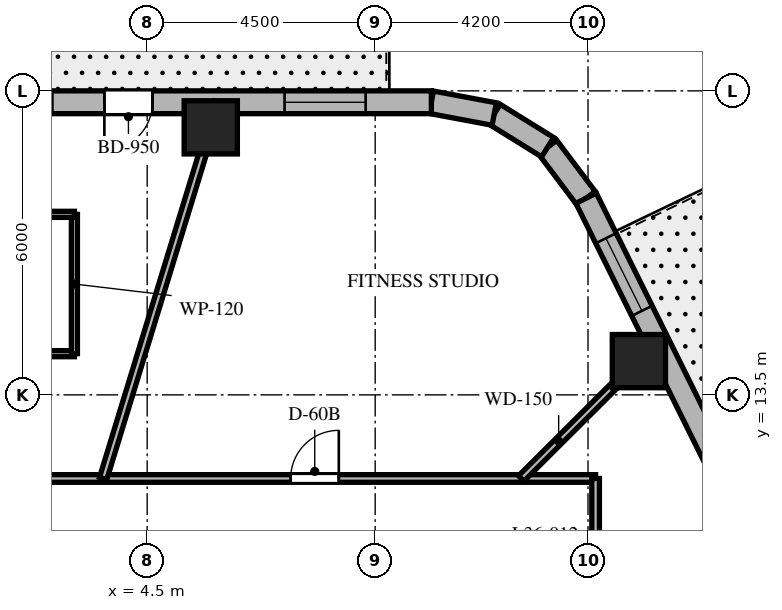
"""IFC4 building model, lengths in metres.
Left out: names, types, materials, properties, quantities, classifications, styles, units other than length and angle.
Written with IfcOpenShell. Run it as: python <this file> out.ifc"""

import sys

from ifc_helpers import new_model, si_unit, direction, frame, frame_2d, origin, origin_2d, place, context, subcontext, project, spatial, rectangle, extrude, element, fill, save


model = new_model("IFC4")
c1 = context("Model", 3, precision=1e-05, world=origin(), true_north=direction((0.0, 1.0)))
c2 = subcontext(c1, "Body", "Model", "MODEL_VIEW")
j1 = project(units=[si_unit("LENGTHUNIT", "METRE"), si_unit("PLANEANGLEUNIT", "RADIAN")], contexts=[c1])
p1 = place(None, origin())
s1 = spatial("IfcSite", under=j1, at=p1, CompositionType="ELEMENT")
p2 = place(p1, origin())
s2 = spatial("IfcBuilding", under=s1, at=p2, CompositionType="ELEMENT")
p3 = place(p2, frame((0.0, 0.0, 148.0)))
s3 = spatial("IfcBuildingStorey", under=s2, at=p3, CompositionType="ELEMENT", Elevation=148.0)
for number, where, z_axis, x_axis in (
    (1, (14.204, 14.166, 0.0), (0.0, 0.0, 1.0), (1.0, 0.0, 0.0)),
    (2, (5.755, 18.78, 0.0), (0.0, 0.0, 1.0), (1.0, 0.0, 0.0)),
):
    element("IfcColumn", number, at=place(p3, frame(where, z_axis=z_axis, x_axis=x_axis)), inside=s3, PredefinedType="COLUMN", context=c2, shape_type="SweptSolid", body=[
        extrude(rectangle(XDim=1.05, YDim=1.05, at=origin_2d()), origin(), (0.0, 0.0, 1.0), 3.7),
    ])
p4 = place(p3, frame((13.162, 17.381, 0.0), z_axis=(0.0, 0.0, 1.0), x_axis=(-0.601515770517, 0.798860925205, 0.0)))
e3 = element("IfcWall", 3, at=p4, inside=s3, PredefinedType="SOLIDWALL", context=c2, shape_type="SweptSolid", body=[
    extrude(rectangle(XDim=1.262, YDim=0.45, at=frame_2d((0.631, 0.0))), origin(), (0.0, 0.0, 1.0), 3.4),
])
p5 = place(p3, frame((12.403, 18.389, 0.0), z_axis=(0.0, 0.0, 1.0), x_axis=(-0.849795170926, 0.527113049991, 0.0)))
e4 = element("IfcWall", 4, at=p5, inside=s3, PredefinedType="SOLIDWALL", context=c2, shape_type="SweptSolid", body=[
    extrude(rectangle(XDim=1.241, YDim=0.45, at=frame_2d((0.62, 0.0))), origin(), (0.0, 0.0, 1.0), 3.4),
])
p6 = place(p3, frame((11.349, 19.043, 0.0), z_axis=(0.0, 0.0, 1.0), x_axis=(-0.982931267051, 0.183973161772, 0.0)))
e5 = element("IfcWall", 5, at=p6, inside=s3, PredefinedType="SOLIDWALL", context=c2, shape_type="SweptSolid", body=[
    extrude(rectangle(XDim=1.262, YDim=0.45, at=frame_2d((0.631, 0.0))), origin(), (0.0, 0.0, 1.0), 3.4),
])
p7 = place(p3, frame((20.618, 2.344, 0.0), z_axis=(0.0, 0.0, 1.0), x_axis=(-0.444243691097, 0.895905990002, 0.0)))
e6 = element("IfcWall", 6, at=p7, inside=s3, PredefinedType="SOLIDWALL", context=c2, shape_type="SweptSolid", body=[
    extrude(rectangle(XDim=16.784, YDim=0.45, at=frame_2d((8.392, 0.0))), origin(), (0.0, 0.0, 1.0), 3.4),
])
p8 = place(p7, frame((4.535, 0.0, 0.0)))
e7 = element("IfcOpeningElement", 7, at=p8, cuts=e6, PredefinedType="OPENING", context=c2, shape_type="SweptSolid", body=[
    extrude(rectangle(XDim=1.0, YDim=2.15, at=frame_2d((0.5, 1.075))), frame((0.0, 0.235, 0.0), z_axis=(0.0, -1.0, 0.0), x_axis=(1.0, 0.0, 0.0)), (0.0, 0.0, 1.0), 0.47),
])
p9 = place(p7, frame((7.642, 0.0, 0.8)))
e8 = element("IfcOpeningElement", 8, at=p9, cuts=e6, PredefinedType="OPENING", context=c2, shape_type="SweptSolid", body=[
    extrude(rectangle(XDim=1.6, YDim=1.75, at=frame_2d((0.8, 0.875))), frame((0.0, 0.235, 0.0), z_axis=(0.0, -1.0, 0.0), x_axis=(1.0, 0.0, 0.0)), (0.0, 0.0, 1.0), 0.47),
])
p10 = place(p7, frame((14.303, 0.0, 0.8)))
e9 = element("IfcOpeningElement", 9, at=p10, cuts=e6, PredefinedType="OPENING", context=c2, shape_type="SweptSolid", body=[
    extrude(rectangle(XDim=1.6, YDim=1.75, at=frame_2d((0.8, 0.875))), frame((0.0, 0.235, 0.0), z_axis=(0.0, -1.0, 0.0), x_axis=(1.0, 0.0, 0.0)), (0.0, 0.0, 1.0), 0.47),
])
p11 = place(p7, frame((0.931, 0.0, 0.8)))
e10 = element("IfcOpeningElement", 10, at=p11, cuts=e6, PredefinedType="OPENING", context=c2, shape_type="SweptSolid", body=[
    extrude(rectangle(XDim=1.6, YDim=1.75, at=frame_2d((0.8, 0.875))), frame((0.0, 0.235, 0.0), z_axis=(0.0, -1.0, 0.0), x_axis=(1.0, 0.0, 0.0)), (0.0, 0.0, 1.0), 0.47),
])
p12 = place(p3, frame((10.108, 19.275, 0.0), z_axis=(0.0, 0.0, 1.0), x_axis=(-1.0, 0.0, 0.0)))
e11 = element("IfcWall", 11, at=p12, inside=s3, PredefinedType="SOLIDWALL", context=c2, shape_type="SweptSolid", body=[
    extrude(rectangle(XDim=21.829, YDim=0.45, at=frame_2d((10.915, 0.0))), origin(), (0.0, 0.0, 1.0), 3.4),
])
p13 = place(p12, frame((5.503, 0.0, 0.0)))
e12 = element("IfcOpeningElement", 12, at=p13, cuts=e11, PredefinedType="OPENING", context=c2, shape_type="SweptSolid", body=[
    extrude(rectangle(XDim=0.95, YDim=2.15, at=frame_2d((0.475, 1.075))), frame((0.0, 0.235, 0.0), z_axis=(0.0, -1.0, 0.0), x_axis=(1.0, 0.0, 0.0)), (0.0, 0.0, 1.0), 0.47),
])
p14 = place(p12, frame((1.297, 0.0, 0.8)))
e13 = element("IfcOpeningElement", 13, at=p14, cuts=e11, PredefinedType="OPENING", context=c2, shape_type="SweptSolid", body=[
    extrude(rectangle(XDim=1.6, YDim=1.75, at=frame_2d((0.8, 0.875))), frame((0.0, 0.235, 0.0), z_axis=(0.0, -1.0, 0.0), x_axis=(1.0, 0.0, 0.0)), (0.0, 0.0, 1.0), 0.47),
])
p15 = place(p12, frame((7.479, 0.0, 0.8)))
e14 = element("IfcOpeningElement", 14, at=p15, cuts=e11, PredefinedType="OPENING", context=c2, shape_type="SweptSolid", body=[
    extrude(rectangle(XDim=1.6, YDim=1.75, at=frame_2d((0.8, 0.875))), frame((0.0, 0.235, 0.0), z_axis=(0.0, -1.0, 0.0), x_axis=(1.0, 0.0, 0.0)), (0.0, 0.0, 1.0), 0.47),
])
p16 = place(p12, frame((13.461, 0.0, 0.8)))
e15 = element("IfcOpeningElement", 15, at=p16, cuts=e11, PredefinedType="OPENING", context=c2, shape_type="SweptSolid", body=[
    extrude(rectangle(XDim=1.6, YDim=1.75, at=frame_2d((0.8, 0.875))), frame((0.0, 0.235, 0.0), z_axis=(0.0, -1.0, 0.0), x_axis=(1.0, 0.0, 0.0)), (0.0, 0.0, 1.0), 0.47),
])
p17 = place(p12, frame((18.933, 0.0, 0.8)))
e16 = element("IfcOpeningElement", 16, at=p17, cuts=e11, PredefinedType="OPENING", context=c2, shape_type="SweptSolid", body=[
    extrude(rectangle(XDim=1.6, YDim=1.75, at=frame_2d((0.8, 0.875))), frame((0.0, 0.235, 0.0), z_axis=(0.0, -1.0, 0.0), x_axis=(1.0, 0.0, 0.0)), (0.0, 0.0, 1.0), 0.47),
])
p18 = place(p3, frame((-13.35, 11.85, 0.0), z_axis=(0.0, 0.0, 1.0), x_axis=(1.0, 0.0, 0.0)))
e17 = element("IfcWall", 17, at=p18, inside=s3, PredefinedType="PARTITIONING", context=c2, shape_type="SweptSolid", body=[
    extrude(rectangle(XDim=26.7, YDim=0.15, at=frame_2d((13.35, 0.0))), origin(), (0.0, 0.0, 1.0), 2.84),
])
p19 = place(p18, frame((20.682, 0.0, 0.0)))
e18 = element("IfcOpeningElement", 18, at=p19, cuts=e17, PredefinedType="OPENING", context=c2, shape_type="SweptSolid", body=[
    extrude(rectangle(XDim=0.95, YDim=2.03, at=frame_2d((0.475, 1.015))), frame((0.0, 0.085, 0.0), z_axis=(0.0, -1.0, 0.0), x_axis=(1.0, 0.0, 0.0)), (0.0, 0.0, 1.0), 0.17),
])
p20 = place(p18, frame((14.229, 0.0, 0.0)))
e19 = element("IfcOpeningElement", 19, at=p20, cuts=e17, PredefinedType="OPENING", context=c2, shape_type="SweptSolid", body=[
    extrude(rectangle(XDim=0.95, YDim=2.03, at=frame_2d((0.475, 1.015))), frame((0.0, 0.085, 0.0), z_axis=(0.0, -1.0, 0.0), x_axis=(1.0, 0.0, 0.0)), (0.0, 0.0, 1.0), 0.17),
])
p21 = place(p18, frame((10.075, 0.0, 0.0)))
e20 = element("IfcOpeningElement", 20, at=p21, cuts=e17, PredefinedType="OPENING", context=c2, shape_type="SweptSolid", body=[
    extrude(rectangle(XDim=0.95, YDim=2.03, at=frame_2d((0.475, 1.015))), frame((0.0, 0.085, 0.0), z_axis=(0.0, -1.0, 0.0), x_axis=(1.0, 0.0, 0.0)), (0.0, 0.0, 1.0), 0.17),
])
p22 = place(p18, frame((3.995, 0.0, 0.0)))
e21 = element("IfcOpeningElement", 21, at=p22, cuts=e17, PredefinedType="OPENING", context=c2, shape_type="SweptSolid", body=[
    extrude(rectangle(XDim=0.95, YDim=2.03, at=frame_2d((0.475, 1.015))), frame((0.0, 0.085, 0.0), z_axis=(0.0, -1.0, 0.0), x_axis=(1.0, 0.0, 0.0)), (0.0, 0.0, 1.0), 0.17),
])
p23 = place(p3, frame((13.35, 11.85, 0.0), z_axis=(0.0, 0.0, 1.0), x_axis=(0.0, -1.0, 0.0)))
e22 = element("IfcWall", 22, at=p23, inside=s3, PredefinedType="PARTITIONING", context=c2, shape_type="SweptSolid", body=[
    extrude(rectangle(XDim=23.7, YDim=0.15, at=frame_2d((11.85, 0.0))), origin(), (0.0, 0.0, 1.0), 2.84),
])
p24 = place(p23, frame((3.765, 0.0, 0.0)))
e23 = element("IfcOpeningElement", 23, at=p24, cuts=e22, PredefinedType="OPENING", context=c2, shape_type="SweptSolid", body=[
    extrude(rectangle(XDim=0.9, YDim=2.03, at=frame_2d((0.45, 1.015))), frame((0.0, 0.085, 0.0), z_axis=(0.0, -1.0, 0.0), x_axis=(1.0, 0.0, 0.0)), (0.0, 0.0, 1.0), 0.17),
])
p25 = place(p23, frame((20.395, 0.0, 0.0)))
e24 = element("IfcOpeningElement", 24, at=p25, cuts=e22, PredefinedType="OPENING", context=c2, shape_type="SweptSolid", body=[
    extrude(rectangle(XDim=0.9, YDim=2.03, at=frame_2d((0.45, 1.015))), frame((0.0, 0.085, 0.0), z_axis=(0.0, -1.0, 0.0), x_axis=(1.0, 0.0, 0.0)), (0.0, 0.0, 1.0), 0.17),
])
p26 = place(p23, frame((15.787, 0.0, 0.0)))
e25 = element("IfcOpeningElement", 25, at=p26, cuts=e22, PredefinedType="OPENING", context=c2, shape_type="SweptSolid", body=[
    extrude(rectangle(XDim=0.95, YDim=2.03, at=frame_2d((0.475, 1.015))), frame((0.0, 0.085, 0.0), z_axis=(0.0, -1.0, 0.0), x_axis=(1.0, 0.0, 0.0)), (0.0, 0.0, 1.0), 0.17),
])
p27 = place(p23, frame((10.751, 0.0, 0.0)))
e26 = element("IfcOpeningElement", 26, at=p27, cuts=e22, PredefinedType="OPENING", context=c2, shape_type="SweptSolid", body=[
    extrude(rectangle(XDim=0.95, YDim=2.03, at=frame_2d((0.475, 1.015))), frame((0.0, 0.085, 0.0), z_axis=(0.0, -1.0, 0.0), x_axis=(1.0, 0.0, 0.0)), (0.0, 0.0, 1.0), 0.17),
])
p28 = place(p3, frame((11.882, 11.85, 0.0), z_axis=(0.0, 0.0, 1.0), x_axis=(0.708037373639, 0.706174962407, 0.0)))
e27 = element("IfcWall", 27, at=p28, inside=s3, PredefinedType="PARTITIONING", context=c2, shape_type="SweptSolid", body=[
    extrude(rectangle(XDim=3.802, YDim=0.15, at=frame_2d((1.901, 0.0))), origin(), (0.0, 0.0, 1.0), 2.64),
])
p29 = place(p3, frame((3.631, 11.85, 0.0), z_axis=(0.0, 0.0, 1.0), x_axis=(0.293007573338, 0.956110120209, 0.0)))
e28 = element("IfcWall", 28, at=p29, inside=s3, PredefinedType="PARTITIONING", context=c2, shape_type="SweptSolid", body=[
    extrude(rectangle(XDim=7.766, YDim=0.15, at=frame_2d((3.883, 0.0))), origin(), (0.0, 0.0, 1.0), 2.64),
])
p30 = place(p3, frame((0.464, 14.313, 0.0), z_axis=(0.0, 0.0, 1.0), x_axis=(1.0, 0.0, 0.0)))
e29 = element("IfcWall", 29, at=p30, inside=s3, PredefinedType="PARTITIONING", context=c2, shape_type="SweptSolid", body=[
    extrude(rectangle(XDim=2.6, YDim=0.12, at=frame_2d((1.3, 0.0))), origin(), (0.0, 0.0, 1.0), 3.4),
])
p31 = place(p30, frame((0.875, 0.0, 0.0)))
e30 = element("IfcOpeningElement", 30, at=p31, cuts=e29, PredefinedType="OPENING", context=c2, shape_type="SweptSolid", body=[
    extrude(rectangle(XDim=0.85, YDim=2.03, at=frame_2d((0.425, 1.015))), frame((0.0, 0.07, 0.0), z_axis=(0.0, -1.0, 0.0), x_axis=(1.0, 0.0, 0.0)), (0.0, 0.0, 1.0), 0.14),
])
p32 = place(p3, frame((3.064, 14.313, 0.0), z_axis=(0.0, 0.0, 1.0), x_axis=(0.0, 1.0, 0.0)))
e31 = element("IfcWall", 31, at=p32, inside=s3, PredefinedType="PARTITIONING", context=c2, shape_type="SweptSolid", body=[
    extrude(rectangle(XDim=2.75, YDim=0.12, at=frame_2d((1.375, 0.0))), origin(), (0.0, 0.0, 1.0), 2.841),
])
p33 = place(p3, frame((3.064, 17.063, 0.0), z_axis=(0.0, 0.0, 1.0), x_axis=(-1.0, 0.0, 0.0)))
e32 = element("IfcWall", 32, at=p33, inside=s3, PredefinedType="PARTITIONING", context=c2, shape_type="SweptSolid", body=[
    extrude(rectangle(XDim=2.6, YDim=0.12, at=frame_2d((1.3, 0.0))), origin(), (0.0, 0.0, 1.0), 3.4),
])
p34 = place(p10, origin())
e33 = element("IfcWindow", 33, at=p34, inside=s3, PartitioningType="SINGLE_PANEL", PredefinedType="WINDOW", context=c2, shape_type="SweptSolid", body=[
    extrude(rectangle(XDim=1.6, YDim=1.75, at=frame_2d((0.8, 0.875))), frame((0.0, 0.03, 0.0), z_axis=(0.0, -1.0, 0.0), x_axis=(1.0, 0.0, 0.0)), (0.0, 0.0, 1.0), 0.06),
])
fill(e9, e33)
p35 = place(p13, origin())
e34 = element("IfcDoor", 34, at=p35, inside=s3, OperationType="SINGLE_SWING_RIGHT", PredefinedType="DOOR", context=c2, shape_type="SweptSolid", body=[
    extrude(rectangle(XDim=0.95, YDim=2.15, at=frame_2d((0.475, 1.075))), frame((0.0, 0.025, 0.0), z_axis=(0.0, -1.0, 0.0), x_axis=(1.0, 0.0, 0.0)), (0.0, 0.0, 1.0), 0.05),
])
fill(e12, e34)
p36 = place(p14, origin())
e35 = element("IfcWindow", 35, at=p36, inside=s3, PartitioningType="SINGLE_PANEL", PredefinedType="WINDOW", context=c2, shape_type="SweptSolid", body=[
    extrude(rectangle(XDim=1.6, YDim=1.75, at=frame_2d((0.8, 0.875))), frame((0.0, 0.03, 0.0), z_axis=(0.0, -1.0, 0.0), x_axis=(1.0, 0.0, 0.0)), (0.0, 0.0, 1.0), 0.06),
])
fill(e13, e35)
p37 = place(p19, origin())
e36 = element("IfcDoor", 36, at=p37, inside=s3, OperationType="SINGLE_SWING_RIGHT", PredefinedType="DOOR", context=c2, shape_type="SweptSolid", body=[
    extrude(rectangle(XDim=0.95, YDim=2.03, at=frame_2d((0.475, 1.015))), frame((0.0, 0.025, 0.0), z_axis=(0.0, -1.0, 0.0), x_axis=(1.0, 0.0, 0.0)), (0.0, 0.0, 1.0), 0.05),
])
fill(e18, e36)
save(model, sys.argv[1])
